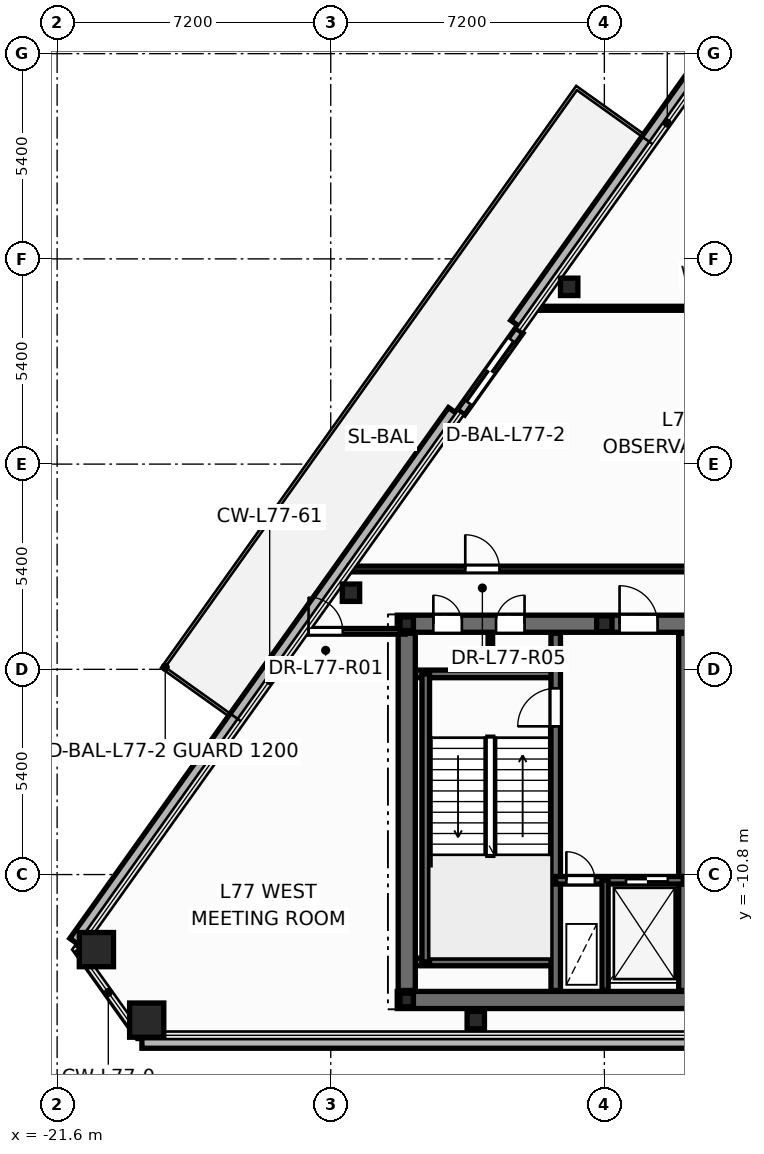
"""IFC4 building model, lengths in metres.
Left out: names, types, materials, properties, quantities, classifications, styles, units other than length and angle.
Written with IfcOpenShell. Run it as: python <this file> out.ifc"""

import sys

from ifc_helpers import new_model, si_unit, direction, frame, frame_2d, origin, origin_2d, place, context, subcontext, project, spatial, rectangle, hollow_rectangle, hollow_circle, i_section, extrude, element, fill, save


model = new_model("IFC4")
c1 = context("Model", 3, precision=1e-05, world=origin(), true_north=direction((0.0, 1.0)))
c2 = subcontext(c1, "Body", "Model", "MODEL_VIEW")
j1 = project(units=[si_unit("LENGTHUNIT", "METRE"), si_unit("PLANEANGLEUNIT", "RADIAN")], contexts=[c1])
p1 = place(None, origin())
s1 = spatial("IfcSite", under=j1, at=p1, CompositionType="ELEMENT")
p2 = place(p1, origin())
s2 = spatial("IfcBuilding", under=s1, at=p2, CompositionType="ELEMENT")
p3 = place(p2, frame((0.0, 0.0, 293.4)))
s3 = spatial("IfcBuildingStorey", under=s2, at=p3, CompositionType="ELEMENT", Elevation=293.4)
for number, where, z_axis, x_axis in (
    (1, (-20.567, -12.775, 0.0), (0.0, 0.0, 1.0), (1.0, 0.0, 0.0)),
    (2, (-19.243, -14.63, 0.0), (0.0, 0.0, 1.0), (1.0, 0.0, 0.0)),
):
    element("IfcColumn", number, at=place(p3, frame(where, z_axis=z_axis, x_axis=x_axis)), inside=s3, PredefinedType="COLUMN", context=c2, shape_type="SweptSolid", body=[
        extrude(hollow_rectangle(XDim=0.9, YDim=0.9, WallThickness=0.04, at=origin_2d()), origin(), (0.0, 0.0, 1.0), 4.2),
    ])
for number, where, z_axis, x_axis in (
    (3, (-10.583, -14.63, 0.0), (0.0, 0.0, 1.0), (1.0, 0.0, 0.0)),
    (4, (-8.126, 4.664, 0.0), (0.0, 0.0, 1.0), (1.0, 0.0, 0.0)),
    (5, (-13.868, -3.385, 0.0), (0.0, 0.0, 1.0), (1.0, 0.0, 0.0)),
):
    element("IfcColumn", number, at=place(p3, frame(where, z_axis=z_axis, x_axis=x_axis)), inside=s3, PredefinedType="COLUMN", context=c2, shape_type="SweptSolid", body=[
        extrude(hollow_circle(Radius=0.229, WallThickness=0.016, at=origin_2d()), origin(), (0.0, 0.0, 1.0), 4.2),
    ])
for number, where, z_axis, x_axis in (
    (6, (-12.4, -14.1, 0.0), (0.0, 0.0, 1.0), (1.0, 0.0, 0.0)),
    (7, (-12.4, -4.2, 0.0), (0.0, 0.0, 1.0), (1.0, 0.0, 0.0)),
):
    element("IfcColumn", number, at=place(p3, frame(where, z_axis=z_axis, x_axis=x_axis)), inside=s3, PredefinedType="COLUMN", context=c2, shape_type="SweptSolid", body=[
        extrude(i_section(OverallWidth=0.352, OverallDepth=0.359, WebThickness=0.018, FlangeThickness=0.026, at=origin_2d()), origin(), (0.0, 0.0, 1.0), 4.2),
    ])
p4 = place(p3, frame((-7.2, -4.2, 0.0), z_axis=(0.0, 0.0, 1.0), x_axis=(1.0, 0.0, 0.0)))
e8 = element("IfcColumn", 8, at=p4, inside=s3, PredefinedType="PILASTER", context=c2, shape_type="SweptSolid", body=[
    extrude(i_section(OverallWidth=0.405, OverallDepth=0.414, WebThickness=0.022, FlangeThickness=0.032, at=origin_2d()), origin(), (0.0, 0.0, 1.0), 4.2),
])
p5 = place(p3, frame((-19.369, -15.19, -0.2), z_axis=(0.0, 0.0, 1.0), x_axis=(1.0, 0.0, 0.0)))
e9 = element("IfcWall", 9, at=p5, inside=s3, PredefinedType="PARAPET", context=c2, shape_type="SweptSolid", body=[
    extrude(rectangle(XDim=38.738, YDim=0.36, at=frame_2d((19.369, 0.0))), origin(), (0.0, 0.0, 1.0), 0.38),
])
p6 = place(p3, frame((-1.833, 14.45, -0.2), z_axis=(0.0, 0.0, 1.0), x_axis=(-0.58075810662, -0.814076176777, 0.0)))
e10 = element("IfcWall", 10, at=p6, inside=s3, PredefinedType="PARAPET", context=c2, shape_type="SweptSolid", body=[
    extrude(rectangle(XDim=13.231, YDim=0.36, at=frame_2d((6.616, 0.0))), origin(), (0.0, 0.0, 1.0), 0.38),
])
p7 = place(p3, frame((-11.155, 1.383, -0.2), z_axis=(0.0, 0.0, 1.0), x_axis=(-0.580765612452, -0.814070822099, 0.0)))
e11 = element("IfcWall", 11, at=p7, inside=s3, PredefinedType="PARAPET", context=c2, shape_type="SweptSolid", body=[
    extrude(rectangle(XDim=17.156, YDim=0.36, at=frame_2d((8.578, 0.0))), origin(), (0.0, 0.0, 1.0), 0.38),
])
p8 = place(p3, frame((-9.439, 3.512, -0.015), z_axis=(0.0, 0.0, 1.0), x_axis=(-0.580756960622, -0.814076994325, 0.0)))
e12 = element("IfcWall", 12, at=p8, inside=s3, PredefinedType="STANDARD", context=c2, shape_type="SweptSolid", body=[
    extrude(rectangle(XDim=2.64, YDim=0.24, at=frame_2d((1.32, 0.0))), origin(), (0.0, 0.0, 1.0), 3.413),
])
p9 = place(p8, frame((0.32, 0.0, 0.015)))
e13 = element("IfcOpeningElement", 13, at=p9, cuts=e12, PredefinedType="OPENING", context=c2, shape_type="SweptSolid", body=[
    extrude(rectangle(XDim=2.006, YDim=2.204, at=frame_2d((1.0, 1.102))), frame((0.0, 0.13, 0.0), z_axis=(0.0, -1.0, 0.0), x_axis=(1.0, 0.0, 0.0)), (0.0, 0.0, 1.0), 0.26),
])
p10 = place(p3, frame((-5.12, -9.45, 0.0), z_axis=(0.0, 0.0, 1.0), x_axis=(1.0, 0.0, 0.0)))
e14 = element("IfcWall", 14, at=p10, inside=s3, PredefinedType="PARTITIONING", context=c2, shape_type="SweptSolid", body=[
    extrude(rectangle(XDim=3.06, YDim=0.15, at=frame_2d((1.53, 0.0))), origin(), (0.0, 0.0, 1.0), 3.88),
])
p11 = place(p3, frame((-10.2, -5.52, 0.0), z_axis=(0.0, 0.0, 1.0), x_axis=(0.0, 1.0, 0.0)))
e15 = element("IfcWall", 15, at=p11, inside=s3, PredefinedType="PARTITIONING", context=c2, shape_type="SweptSolid", body=[
    extrude(rectangle(XDim=1.12, YDim=0.12, at=frame_2d((0.56, 0.0))), origin(), (0.0, 0.0, 1.0), 3.88),
])
p12 = place(p3, frame((-12.65, -14.1, 0.0), z_axis=(0.0, 0.0, 1.0), x_axis=(1.0, 0.0, 0.0)))
e16 = element("IfcWall", 16, at=p12, inside=s3, PredefinedType="SHEAR", context=c2, shape_type="SweptSolid", body=[
    extrude(rectangle(XDim=25.3, YDim=0.45, at=frame_2d((12.65, 0.0))), origin(), (0.0, 0.0, 1.0), 4.2),
])
p13 = place(p3, frame((-12.65, -4.2, 0.0), z_axis=(0.0, 0.0, 1.0), x_axis=(1.0, 0.0, 0.0)))
e17 = element("IfcWall", 17, at=p13, inside=s3, PredefinedType="SHEAR", context=c2, shape_type="SweptSolid", body=[
    extrude(rectangle(XDim=25.3, YDim=0.45, at=frame_2d((12.65, 0.0))), origin(), (0.0, 0.0, 1.0), 4.2),
])
p14 = place(p13, frame((0.95, 0.0, 0.0)))
e18 = element("IfcOpeningElement", 18, at=p14, cuts=e17, PredefinedType="OPENING", context=c2, shape_type="SweptSolid", body=[
    extrude(rectangle(XDim=0.756, YDim=2.054, at=frame_2d((0.375, 1.027))), frame((0.0, 0.235, 0.0), z_axis=(0.0, -1.0, 0.0), x_axis=(1.0, 0.0, 0.0)), (0.0, 0.0, 1.0), 0.47),
])
p15 = place(p13, frame((2.6, 0.0, 0.0)))
e19 = element("IfcOpeningElement", 19, at=p15, cuts=e17, PredefinedType="OPENING", context=c2, shape_type="SweptSolid", body=[
    extrude(rectangle(XDim=0.756, YDim=2.054, at=frame_2d((0.375, 1.027))), frame((0.0, 0.235, 0.0), z_axis=(0.0, -1.0, 0.0), x_axis=(1.0, 0.0, 0.0)), (0.0, 0.0, 1.0), 0.47),
])
p16 = place(p13, frame((21.85, 0.0, 0.0)))
e20 = element("IfcOpeningElement", 20, at=p16, cuts=e17, PredefinedType="OPENING", context=c2, shape_type="SweptSolid", body=[
    extrude(rectangle(XDim=0.756, YDim=2.054, at=frame_2d((0.375, 1.027))), frame((0.0, 0.235, 0.0), z_axis=(0.0, -1.0, 0.0), x_axis=(1.0, 0.0, 0.0)), (0.0, 0.0, 1.0), 0.47),
])
p17 = place(p13, frame((23.5, 0.0, 0.0)))
e21 = element("IfcOpeningElement", 21, at=p17, cuts=e17, PredefinedType="OPENING", context=c2, shape_type="SweptSolid", body=[
    extrude(rectangle(XDim=0.756, YDim=2.054, at=frame_2d((0.375, 1.027))), frame((0.0, 0.235, 0.0), z_axis=(0.0, -1.0, 0.0), x_axis=(1.0, 0.0, 0.0)), (0.0, 0.0, 1.0), 0.47),
])
p18 = place(p13, frame((5.85, 0.0, 0.0)))
e22 = element("IfcOpeningElement", 22, at=p18, cuts=e17, PredefinedType="OPENING", context=c2, shape_type="SweptSolid", body=[
    extrude(rectangle(XDim=1.006, YDim=2.104, at=frame_2d((0.5, 1.052))), frame((0.0, 0.235, 0.0), z_axis=(0.0, -1.0, 0.0), x_axis=(1.0, 0.0, 0.0)), (0.0, 0.0, 1.0), 0.47),
])
p19 = place(p13, frame((10.35, 0.0, 0.0)))
e23 = element("IfcOpeningElement", 23, at=p19, cuts=e17, PredefinedType="OPENING", context=c2, shape_type="SweptSolid", body=[
    extrude(rectangle(XDim=1.406, YDim=2.154, at=frame_2d((0.7, 1.077))), frame((0.0, 0.235, 0.0), z_axis=(0.0, -1.0, 0.0), x_axis=(1.0, 0.0, 0.0)), (0.0, 0.0, 1.0), 0.47),
])
p20 = place(p13, frame((18.45, 0.0, 0.0)))
e24 = element("IfcOpeningElement", 24, at=p20, cuts=e17, PredefinedType="OPENING", context=c2, shape_type="SweptSolid", body=[
    extrude(rectangle(XDim=1.006, YDim=2.104, at=frame_2d((0.5, 1.052))), frame((0.0, 0.235, 0.0), z_axis=(0.0, -1.0, 0.0), x_axis=(1.0, 0.0, 0.0)), (0.0, 0.0, 1.0), 0.47),
])
for number, where, z_axis, x_axis in (
    (25, (-12.35, -5.52, 0.0), (0.0, 0.0, 1.0), (1.0, 0.0, 0.0)),
    (26, (-12.35, -13.1, 0.0), (0.0, 0.0, 1.0), (1.0, 0.0, 0.0)),
):
    element("IfcWall", number, at=place(p3, frame(where, z_axis=z_axis, x_axis=x_axis)), inside=s3, PredefinedType="SOLIDWALL", context=c2, shape_type="SweptSolid", body=[
        extrude(rectangle(XDim=3.87, YDim=0.2, at=frame_2d((1.935, 0.0))), origin(), (0.0, 0.0, 1.0), 4.2),
    ])
p21 = place(p3, frame((-11.9, -13.1, 0.0), z_axis=(0.0, 0.0, 1.0), x_axis=(0.0, 1.0, 0.0)))
e27 = element("IfcWall", 27, at=p21, inside=s3, PredefinedType="SOLIDWALL", context=c2, shape_type="SweptSolid", body=[
    extrude(rectangle(XDim=7.58, YDim=0.2, at=frame_2d((3.79, 0.0))), origin(), (0.0, 0.0, 1.0), 4.2),
])
p22 = place(p3, frame((-8.48, -13.85, 0.0), z_axis=(0.0, 0.0, 1.0), x_axis=(0.0, 1.0, 0.0)))
e28 = element("IfcWall", 28, at=p22, inside=s3, PredefinedType="SHEAR", context=c2, shape_type="SweptSolid", body=[
    extrude(rectangle(XDim=9.4, YDim=0.25, at=frame_2d((4.7, 0.0))), origin(), (0.0, 0.0, 1.0), 4.2),
])
p23 = place(p22, frame((6.95, 0.0, 0.0)))
e29 = element("IfcOpeningElement", 29, at=p23, cuts=e28, PredefinedType="OPENING", context=c2, shape_type="SweptSolid", body=[
    extrude(rectangle(XDim=1.006, YDim=2.104, at=frame_2d((0.5, 1.052))), frame((0.0, 0.135, 0.0), z_axis=(0.0, -1.0, 0.0), x_axis=(1.0, 0.0, 0.0)), (0.0, 0.0, 1.0), 0.27),
])
p24 = place(p3, frame((-5.12, -13.85, 0.0), z_axis=(0.0, 0.0, 1.0), x_axis=(0.0, 1.0, 0.0)))
e30 = element("IfcWall", 30, at=p24, inside=s3, PredefinedType="SHEAR", context=c2, shape_type="SweptSolid", body=[
    extrude(rectangle(XDim=9.4, YDim=0.25, at=frame_2d((4.7, 0.0))), origin(), (0.0, 0.0, 1.0), 4.2),
])
p25 = place(p3, frame((-8.48, -10.95, 0.0), z_axis=(0.0, 0.0, 1.0), x_axis=(1.0, 0.0, 0.0)))
e31 = element("IfcWall", 31, at=p25, inside=s3, PredefinedType="SOLIDWALL", context=c2, shape_type="SweptSolid", body=[
    extrude(rectangle(XDim=3.36, YDim=0.2, at=frame_2d((1.68, 0.0))), origin(), (0.0, 0.0, 1.0), 4.2),
])
p26 = place(p25, frame((0.28, 0.0, 0.0)))
e32 = element("IfcOpeningElement", 32, at=p26, cuts=e31, PredefinedType="OPENING", context=c2, shape_type="SweptSolid", body=[
    extrude(rectangle(XDim=0.756, YDim=2.054, at=frame_2d((0.375, 1.027))), frame((0.0, 0.11, 0.0), z_axis=(0.0, -1.0, 0.0), x_axis=(1.0, 0.0, 0.0)), (0.0, 0.0, 1.0), 0.22),
])
p27 = place(p25, frame((1.85, 0.0, 0.0)))
e33 = element("IfcOpeningElement", 33, at=p27, cuts=e31, PredefinedType="OPENING", context=c2, shape_type="SweptSolid", body=[
    extrude(rectangle(XDim=1.106, YDim=2.104, at=frame_2d((0.55, 1.052))), frame((0.0, 0.11, 0.0), z_axis=(0.0, -1.0, 0.0), x_axis=(1.0, 0.0, 0.0)), (0.0, 0.0, 1.0), 0.22),
])
p28 = place(p3, frame((-5.12, -10.95, 0.0), z_axis=(0.0, 0.0, 1.0), x_axis=(1.0, 0.0, 0.0)))
e34 = element("IfcWall", 34, at=p28, inside=s3, PredefinedType="SOLIDWALL", context=c2, shape_type="SweptSolid", body=[
    extrude(rectangle(XDim=10.24, YDim=0.2, at=frame_2d((5.12, 0.0))), origin(), (0.0, 0.0, 1.0), 4.2),
])
p29 = place(p28, frame((0.6, 0.0, 0.0)))
e35 = element("IfcOpeningElement", 35, at=p29, cuts=e34, PredefinedType="OPENING", context=c2, shape_type="SweptSolid", body=[
    extrude(rectangle(XDim=1.106, YDim=2.104, at=frame_2d((0.55, 1.052))), frame((0.0, 0.11, 0.0), z_axis=(0.0, -1.0, 0.0), x_axis=(1.0, 0.0, 0.0)), (0.0, 0.0, 1.0), 0.22),
])
p30 = place(p28, frame((4.65, 0.0, 0.0)))
e36 = element("IfcOpeningElement", 36, at=p30, cuts=e34, PredefinedType="OPENING", context=c2, shape_type="SweptSolid", body=[
    extrude(rectangle(XDim=0.956, YDim=2.104, at=frame_2d((0.475, 1.052))), frame((0.0, 0.11, 0.0), z_axis=(0.0, -1.0, 0.0), x_axis=(1.0, 0.0, 0.0)), (0.0, 0.0, 1.0), 0.22),
])
p31 = place(p28, frame((8.54, 0.0, 0.0)))
e37 = element("IfcOpeningElement", 37, at=p31, cuts=e34, PredefinedType="OPENING", context=c2, shape_type="SweptSolid", body=[
    extrude(rectangle(XDim=1.106, YDim=2.104, at=frame_2d((0.55, 1.052))), frame((0.0, 0.11, 0.0), z_axis=(0.0, -1.0, 0.0), x_axis=(1.0, 0.0, 0.0)), (0.0, 0.0, 1.0), 0.22),
])
p32 = place(p3, frame((-7.18, -13.85, 0.0), z_axis=(0.0, 0.0, 1.0), x_axis=(0.0, 1.0, 0.0)))
e38 = element("IfcWall", 38, at=p32, inside=s3, PredefinedType="PARTITIONING", context=c2, shape_type="SweptSolid", body=[
    extrude(rectangle(XDim=2.9, YDim=0.16, at=frame_2d((1.45, 0.0))), origin(), (0.0, 0.0, 1.0), 3.105),
])
p33 = place(p3, frame((-12.4, -13.85, 0.0), z_axis=(0.0, 0.0, 1.0), x_axis=(0.0, 1.0, 0.0)))
e39 = element("IfcWall", 39, at=p33, inside=s3, PredefinedType="SHEAR", context=c2, shape_type="SweptSolid", body=[
    extrude(rectangle(XDim=9.4, YDim=0.45, at=frame_2d((4.7, 0.0))), origin(), (0.0, 0.0, 1.0), 4.2),
])
p34 = place(p3, frame((-13.914, -2.76, 0.0), z_axis=(0.0, 0.0, 1.0), x_axis=(1.0, 0.0, 0.0)))
e40 = element("IfcWall", 40, at=p34, inside=s3, PredefinedType="PARTITIONING", context=c2, shape_type="SweptSolid", body=[
    extrude(rectangle(XDim=13.174, YDim=0.15, at=frame_2d((6.587, 0.0))), origin(), (0.0, 0.0, 1.0), 2.855),
])
p35 = place(p34, frame((3.053, 0.0, 0.0)))
e41 = element("IfcOpeningElement", 41, at=p35, cuts=e40, PredefinedType="OPENING", context=c2, shape_type="SweptSolid", body=[
    extrude(rectangle(XDim=0.906, YDim=2.104, at=frame_2d((0.45, 1.052))), frame((0.0, 0.085, 0.0), z_axis=(0.0, -1.0, 0.0), x_axis=(1.0, 0.0, 0.0)), (0.0, 0.0, 1.0), 0.17),
])
p36 = place(p3, frame((-9.02, 4.1, 0.0), z_axis=(0.0, 0.0, 1.0), x_axis=(1.0, 0.0, 0.0)))
e42 = element("IfcWall", 42, at=p36, inside=s3, PredefinedType="PARTITIONING", context=c2, shape_type="SweptSolid", body=[
    extrude(rectangle(XDim=11.02, YDim=0.105, at=frame_2d((5.51, 0.0))), origin(), (0.0, 0.0, 1.0), 2.855),
])
p37 = place(p3, frame((-15.083, -4.4, 0.0), z_axis=(0.0, 0.0, 1.0), x_axis=(1.0, 0.0, 0.0)))
e43 = element("IfcWall", 43, at=p37, inside=s3, PredefinedType="PARTITIONING", context=c2, shape_type="SweptSolid", body=[
    extrude(rectangle(XDim=2.644, YDim=0.15, at=frame_2d((1.322, 0.0))), origin(), (0.0, 0.0, 1.0), 2.855),
])
p38 = place(p37, frame((0.1, 0.0, 0.0)))
e44 = element("IfcOpeningElement", 44, at=p38, cuts=e43, PredefinedType="OPENING", context=c2, shape_type="SweptSolid", body=[
    extrude(rectangle(XDim=0.906, YDim=2.104, at=frame_2d((0.45, 1.052))), frame((0.0, 0.085, 0.0), z_axis=(0.0, -1.0, 0.0), x_axis=(1.0, 0.0, 0.0)), (0.0, 0.0, 1.0), 0.17),
])
p39 = place(p9, origin())
e45 = element("IfcDoor", 45, at=p39, inside=s3, OperationType="DOUBLE_DOOR_SLIDING", PredefinedType="DOOR", context=c2, shape_type="SweptSolid", body=[
    extrude(rectangle(XDim=2.0, YDim=2.2, at=frame_2d((1.0, 1.1))), frame((0.0, 0.025, 0.0), z_axis=(0.0, -1.0, 0.0), x_axis=(1.0, 0.0, 0.0)), (0.0, 0.0, 1.0), 0.05),
])
fill(e13, e45)
p40 = place(p23, origin())
e46 = element("IfcDoor", 46, at=p40, inside=s3, OperationType="SINGLE_SWING_LEFT", PredefinedType="DOOR", context=c2, shape_type="SweptSolid", body=[
    extrude(rectangle(XDim=1.0, YDim=2.1, at=frame_2d((0.5, 1.05))), frame((0.0, 0.025, 0.0), z_axis=(0.0, -1.0, 0.0), x_axis=(1.0, 0.0, 0.0)), (0.0, 0.0, 1.0), 0.05),
])
fill(e29, e46)
p41 = place(p26, origin())
e47 = element("IfcDoor", 47, at=p41, inside=s3, OperationType="SINGLE_SWING_LEFT", PredefinedType="DOOR", context=c2, shape_type="SweptSolid", body=[
    extrude(rectangle(XDim=0.75, YDim=2.05, at=frame_2d((0.375, 1.025))), frame((0.0, 0.025, 0.0), z_axis=(0.0, -1.0, 0.0), x_axis=(1.0, 0.0, 0.0)), (0.0, 0.0, 1.0), 0.05),
])
fill(e32, e47)
p42 = place(p27, origin())
e48 = element("IfcDoor", 48, at=p42, inside=s3, OperationType="DOUBLE_DOOR_SLIDING", PredefinedType="DOOR", context=c2, shape_type="SweptSolid", body=[
    extrude(rectangle(XDim=1.1, YDim=2.1, at=frame_2d((0.55, 1.05))), frame((0.0, 0.025, 0.0), z_axis=(0.0, -1.0, 0.0), x_axis=(1.0, 0.0, 0.0)), (0.0, 0.0, 1.0), 0.05),
])
fill(e33, e48)
p43 = place(p14, origin())
e49 = element("IfcDoor", 49, at=p43, inside=s3, OperationType="SINGLE_SWING_LEFT", PredefinedType="DOOR", context=c2, shape_type="SweptSolid", body=[
    extrude(rectangle(XDim=0.75, YDim=2.05, at=frame_2d((0.375, 1.025))), frame((0.0, 0.025, 0.0), z_axis=(0.0, -1.0, 0.0), x_axis=(1.0, 0.0, 0.0)), (0.0, 0.0, 1.0), 0.05),
])
fill(e18, e49)
p44 = place(p15, origin())
e50 = element("IfcDoor", 50, at=p44, inside=s3, OperationType="SINGLE_SWING_RIGHT", PredefinedType="DOOR", context=c2, shape_type="SweptSolid", body=[
    extrude(rectangle(XDim=0.75, YDim=2.05, at=frame_2d((0.375, 1.025))), frame((0.0, 0.025, 0.0), z_axis=(0.0, -1.0, 0.0), x_axis=(1.0, 0.0, 0.0)), (0.0, 0.0, 1.0), 0.05),
])
fill(e19, e50)
p45 = place(p18, origin())
e51 = element("IfcDoor", 51, at=p45, inside=s3, OperationType="SINGLE_SWING_LEFT", PredefinedType="DOOR", context=c2, shape_type="SweptSolid", body=[
    extrude(rectangle(XDim=1.0, YDim=2.1, at=frame_2d((0.5, 1.05))), frame((0.0, 0.025, 0.0), z_axis=(0.0, -1.0, 0.0), x_axis=(1.0, 0.0, 0.0)), (0.0, 0.0, 1.0), 0.05),
])
fill(e22, e51)
p46 = place(p38, origin())
e52 = element("IfcDoor", 52, at=p46, inside=s3, OperationType="SINGLE_SWING_LEFT", PredefinedType="DOOR", context=c2, shape_type="SweptSolid", body=[
    extrude(rectangle(XDim=0.9, YDim=2.1, at=frame_2d((0.45, 1.05))), frame((0.0, 0.025, 0.0), z_axis=(0.0, -1.0, 0.0), x_axis=(1.0, 0.0, 0.0)), (0.0, 0.0, 1.0), 0.05),
])
fill(e44, e52)
p47 = place(p35, origin())
e53 = element("IfcDoor", 53, at=p47, inside=s3, OperationType="SINGLE_SWING_LEFT", PredefinedType="DOOR", context=c2, shape_type="SweptSolid", body=[
    extrude(rectangle(XDim=0.9, YDim=2.1, at=frame_2d((0.45, 1.05))), frame((0.0, 0.025, 0.0), z_axis=(0.0, -1.0, 0.0), x_axis=(1.0, 0.0, 0.0)), (0.0, 0.0, 1.0), 0.05),
])
fill(e41, e53)
save(model, sys.argv[1])
